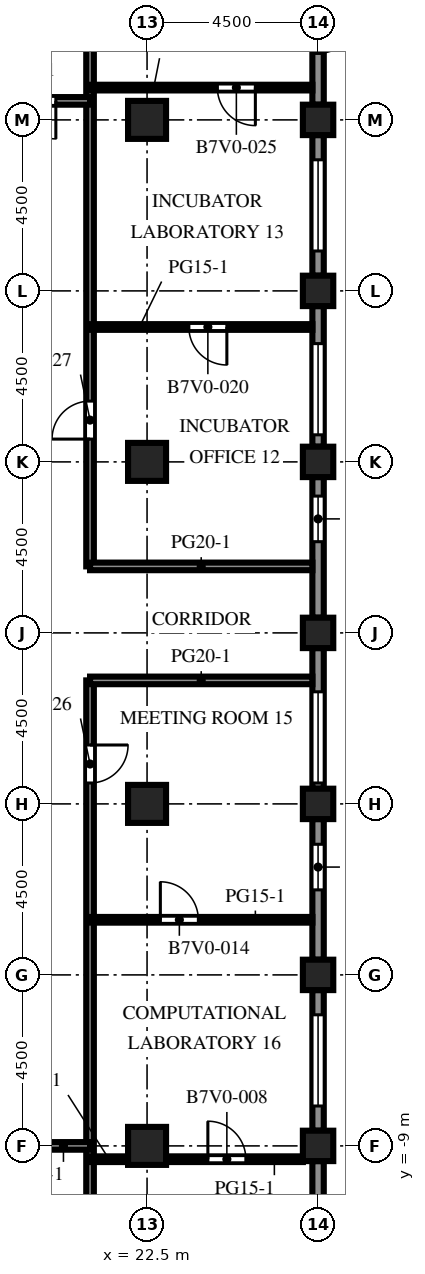
"""IFC4 building model, lengths in metres.
Left out: names, types, materials, properties, quantities, classifications, styles, units other than length and angle.
Written with IfcOpenShell. Run it as: python <this file> out.ifc"""

import sys

from ifc_helpers import new_model, si_unit, direction, frame, frame_2d, origin, origin_2d, place, context, subcontext, project, spatial, rectangle, extrude, element, fill, save


model = new_model("IFC4")
c1 = context("Model", 3, precision=1e-05, world=origin(), true_north=direction((0.0, 1.0)))
c2 = subcontext(c1, "Body", "Model", "MODEL_VIEW")
j1 = project(units=[si_unit("LENGTHUNIT", "METRE"), si_unit("PLANEANGLEUNIT", "RADIAN")], contexts=[c1])
p1 = place(None, origin())
s1 = spatial("IfcSite", under=j1, at=p1, CompositionType="ELEMENT")
p2 = place(p1, origin())
s2 = spatial("IfcBuilding", under=s1, at=p2, CompositionType="ELEMENT")
p3 = place(p2, frame((0.0, 0.0, 239.8)))
s3 = spatial("IfcBuildingStorey", under=s2, at=p3, CompositionType="ELEMENT", Elevation=239.8)
for number, where, z_axis, x_axis in (
    (1, (27.0, -9.0, 0.0), (0.0, 0.0, 1.0), (1.0, 0.0, 0.0)),
    (2, (27.0, -4.5, 0.0), (0.0, 0.0, 1.0), (1.0, 0.0, 0.0)),
    (3, (27.0, 0.0, 0.0), (0.0, 0.0, 1.0), (1.0, 0.0, 0.0)),
    (4, (27.0, 4.5, 0.0), (0.0, 0.0, 1.0), (1.0, 0.0, 0.0)),
    (5, (27.0, 9.0, 0.0), (0.0, 0.0, 1.0), (1.0, 0.0, 0.0)),
    (6, (27.0, 13.5, 0.0), (0.0, 0.0, 1.0), (1.0, 0.0, 0.0)),
    (7, (27.0, 18.0, 0.0), (0.0, 0.0, 1.0), (1.0, 0.0, 0.0)),
):
    element("IfcColumn", number, at=place(p3, frame(where, z_axis=z_axis, x_axis=x_axis)), inside=s3, PredefinedType="COLUMN", context=c2, shape_type="SweptSolid", body=[
        extrude(rectangle(XDim=0.8, YDim=0.8, at=origin_2d()), origin(), (0.0, 0.0, 1.0), 4.1),
    ])
for number, where, z_axis, x_axis in (
    (8, (22.5, -9.0, 0.0), (0.0, 0.0, 1.0), (1.0, 0.0, 0.0)),
    (9, (22.5, 0.0, 0.0), (0.0, 0.0, 1.0), (1.0, 0.0, 0.0)),
    (10, (22.5, 9.0, 0.0), (0.0, 0.0, 1.0), (1.0, 0.0, 0.0)),
    (11, (22.5, 18.0, 0.0), (0.0, 0.0, 1.0), (1.0, 0.0, 0.0)),
):
    element("IfcColumn", number, at=place(p3, frame(where, z_axis=z_axis, x_axis=x_axis)), inside=s3, PredefinedType="COLUMN", context=c2, shape_type="SweptSolid", body=[
        extrude(rectangle(XDim=1.0, YDim=1.0, at=origin_2d()), origin(), (0.0, 0.0, 1.0), 4.1),
    ])
p4 = place(p3, frame((27.0, -9.4, 0.0), z_axis=(0.0, 0.0, 1.0), x_axis=(0.0, -1.0, 0.0)))
e12 = element("IfcWall", 12, at=p4, inside=s3, PredefinedType="SOLIDWALL", context=c2, shape_type="SweptSolid", body=[
    extrude(rectangle(XDim=3.7, YDim=0.3, at=frame_2d((1.85, 0.0))), origin(), (0.0, 0.0, 1.0), 2.85),
])
p5 = place(p4, frame((1.35, 0.0, 0.0)))
e13 = element("IfcOpeningElement", 13, at=p5, cuts=e12, PredefinedType="OPENING", context=c2, shape_type="SweptSolid", body=[
    extrude(rectangle(XDim=1.0, YDim=2.2, at=frame_2d((0.5, 1.1))), frame((0.0, 0.16, 0.0), z_axis=(0.0, -1.0, 0.0), x_axis=(1.0, 0.0, 0.0)), (0.0, 0.0, 1.0), 0.32),
])
p6 = place(p3, frame((27.0, -4.9, 0.0), z_axis=(0.0, 0.0, 1.0), x_axis=(0.0, -1.0, 0.0)))
e14 = element("IfcWall", 14, at=p6, inside=s3, PredefinedType="SOLIDWALL", context=c2, shape_type="SweptSolid", body=[
    extrude(rectangle(XDim=3.7, YDim=0.3, at=frame_2d((1.85, 0.0))), origin(), (0.0, 0.0, 1.0), 2.85),
])
p7 = place(p6, frame((0.65, 0.0, 0.8)))
e15 = element("IfcOpeningElement", 15, at=p7, cuts=e14, PredefinedType="OPENING", context=c2, shape_type="SweptSolid", body=[
    extrude(rectangle(XDim=2.4, YDim=1.7, at=frame_2d((1.2, 0.85))), frame((0.0, 0.16, 0.0), z_axis=(0.0, -1.0, 0.0), x_axis=(1.0, 0.0, 0.0)), (0.0, 0.0, 1.0), 0.32),
])
p8 = place(p3, frame((27.0, -0.4, 0.0), z_axis=(0.0, 0.0, 1.0), x_axis=(0.0, -1.0, 0.0)))
e16 = element("IfcWall", 16, at=p8, inside=s3, PredefinedType="SOLIDWALL", context=c2, shape_type="SweptSolid", body=[
    extrude(rectangle(XDim=3.7, YDim=0.3, at=frame_2d((1.85, 0.0))), origin(), (0.0, 0.0, 1.0), 2.85),
])
p9 = place(p8, frame((0.663, 0.0, 0.8)))
e17 = element("IfcOpeningElement", 17, at=p9, cuts=e16, PredefinedType="OPENING", context=c2, shape_type="SweptSolid", body=[
    extrude(rectangle(XDim=1.2, YDim=1.7, at=frame_2d((0.6, 0.85))), frame((0.0, 0.16, 0.0), z_axis=(0.0, -1.0, 0.0), x_axis=(1.0, 0.0, 0.0)), (0.0, 0.0, 1.0), 0.32),
])
p10 = place(p3, frame((27.0, 4.1, 0.0), z_axis=(0.0, 0.0, 1.0), x_axis=(0.0, -1.0, 0.0)))
e18 = element("IfcWall", 18, at=p10, inside=s3, PredefinedType="SOLIDWALL", context=c2, shape_type="SweptSolid", body=[
    extrude(rectangle(XDim=3.7, YDim=0.3, at=frame_2d((1.85, 0.0))), origin(), (0.0, 0.0, 1.0), 2.85),
])
p11 = place(p10, frame((1.15, 0.0, 0.8)))
e19 = element("IfcOpeningElement", 19, at=p11, cuts=e18, PredefinedType="OPENING", context=c2, shape_type="SweptSolid", body=[
    extrude(rectangle(XDim=2.4, YDim=1.7, at=frame_2d((1.2, 0.85))), frame((0.0, 0.16, 0.0), z_axis=(0.0, -1.0, 0.0), x_axis=(1.0, 0.0, 0.0)), (0.0, 0.0, 1.0), 0.32),
])
p12 = place(p3, frame((27.0, 8.6, 0.0), z_axis=(0.0, 0.0, 1.0), x_axis=(0.0, -1.0, 0.0)))
e20 = element("IfcWall", 20, at=p12, inside=s3, PredefinedType="SOLIDWALL", context=c2, shape_type="SweptSolid", body=[
    extrude(rectangle(XDim=3.7, YDim=0.3, at=frame_2d((1.85, 0.0))), origin(), (0.0, 0.0, 1.0), 2.85),
])
p13 = place(p12, frame((0.5, 0.0, 0.8)))
e21 = element("IfcOpeningElement", 21, at=p13, cuts=e20, PredefinedType="OPENING", context=c2, shape_type="SweptSolid", body=[
    extrude(rectangle(XDim=1.2, YDim=1.7, at=frame_2d((0.6, 0.85))), frame((0.0, 0.16, 0.0), z_axis=(0.0, -1.0, 0.0), x_axis=(1.0, 0.0, 0.0)), (0.0, 0.0, 1.0), 0.32),
])
p14 = place(p3, frame((27.0, 13.1, 0.0), z_axis=(0.0, 0.0, 1.0), x_axis=(0.0, -1.0, 0.0)))
e22 = element("IfcWall", 22, at=p14, inside=s3, PredefinedType="SOLIDWALL", context=c2, shape_type="SweptSolid", body=[
    extrude(rectangle(XDim=3.7, YDim=0.3, at=frame_2d((1.85, 0.0))), origin(), (0.0, 0.0, 1.0), 2.85),
])
p15 = place(p14, frame((0.988, 0.0, 0.8)))
e23 = element("IfcOpeningElement", 23, at=p15, cuts=e22, PredefinedType="OPENING", context=c2, shape_type="SweptSolid", body=[
    extrude(rectangle(XDim=2.4, YDim=1.7, at=frame_2d((1.2, 0.85))), frame((0.0, 0.16, 0.0), z_axis=(0.0, -1.0, 0.0), x_axis=(1.0, 0.0, 0.0)), (0.0, 0.0, 1.0), 0.32),
])
p16 = place(p3, frame((27.0, 17.6, 0.0), z_axis=(0.0, 0.0, 1.0), x_axis=(0.0, -1.0, 0.0)))
e24 = element("IfcWall", 24, at=p16, inside=s3, PredefinedType="SOLIDWALL", context=c2, shape_type="SweptSolid", body=[
    extrude(rectangle(XDim=3.7, YDim=0.3, at=frame_2d((1.85, 0.0))), origin(), (0.0, 0.0, 1.0), 2.85),
])
p17 = place(p16, frame((0.65, 0.0, 0.8)))
e25 = element("IfcOpeningElement", 25, at=p17, cuts=e24, PredefinedType="OPENING", context=c2, shape_type="SweptSolid", body=[
    extrude(rectangle(XDim=2.4, YDim=1.7, at=frame_2d((1.2, 0.85))), frame((0.0, 0.16, 0.0), z_axis=(0.0, -1.0, 0.0), x_axis=(1.0, 0.0, 0.0)), (0.0, 0.0, 1.0), 0.32),
])
p18 = place(p3, frame((27.0, 22.1, 0.0), z_axis=(0.0, 0.0, 1.0), x_axis=(0.0, -1.0, 0.0)))
e26 = element("IfcWall", 26, at=p18, inside=s3, PredefinedType="SOLIDWALL", context=c2, shape_type="SweptSolid", body=[
    extrude(rectangle(XDim=3.7, YDim=0.3, at=frame_2d((1.85, 0.0))), origin(), (0.0, 0.0, 1.0), 2.85),
])
p19 = place(p18, frame((1.35, 0.0, 0.0)))
e27 = element("IfcOpeningElement", 27, at=p19, cuts=e26, PredefinedType="OPENING", context=c2, shape_type="SweptSolid", body=[
    extrude(rectangle(XDim=1.0, YDim=2.2, at=frame_2d((0.5, 1.1))), frame((0.0, 0.16, 0.0), z_axis=(0.0, -1.0, 0.0), x_axis=(1.0, 0.0, 0.0)), (0.0, 0.0, 1.0), 0.32),
])
p20 = place(p3, frame((21.0, 3.25, 0.0), z_axis=(0.0, 0.0, 1.0), x_axis=(0.0, -1.0, 0.0)))
e28 = element("IfcWall", 28, at=p20, inside=s3, PredefinedType="PARTITIONING", context=c2, shape_type="SweptSolid", body=[
    extrude(rectangle(XDim=25.6, YDim=0.2, at=frame_2d((12.8, 0.0))), origin(), (0.0, 0.0, 1.0), 3.65),
])
p21 = place(p20, frame((1.7, 0.0, 0.0)))
e29 = element("IfcOpeningElement", 29, at=p21, cuts=e28, PredefinedType="OPENING", context=c2, shape_type="SweptSolid", body=[
    extrude(rectangle(XDim=1.0, YDim=2.1, at=frame_2d((0.5, 1.05))), frame((0.0, 0.11, 0.0), z_axis=(0.0, -1.0, 0.0), x_axis=(1.0, 0.0, 0.0)), (0.0, 0.0, 1.0), 0.22),
])
p22 = place(p3, frame((21.0, 31.35, 0.0), z_axis=(0.0, 0.0, 1.0), x_axis=(0.0, -1.0, 0.0)))
e30 = element("IfcWall", 30, at=p22, inside=s3, PredefinedType="PARTITIONING", context=c2, shape_type="SweptSolid", body=[
    extrude(rectangle(XDim=25.1, YDim=0.2, at=frame_2d((12.55, 0.0))), origin(), (0.0, 0.0, 1.0), 3.65),
])
p23 = place(p22, frame((20.75, 0.0, 0.0)))
e31 = element("IfcOpeningElement", 31, at=p23, cuts=e30, PredefinedType="OPENING", context=c2, shape_type="SweptSolid", body=[
    extrude(rectangle(XDim=1.0, YDim=2.1, at=frame_2d((0.5, 1.05))), frame((0.0, 0.11, 0.0), z_axis=(0.0, -1.0, 0.0), x_axis=(1.0, 0.0, 0.0)), (0.0, 0.0, 1.0), 0.22),
])
p24 = place(p3, frame((21.0, -9.35, 0.0), z_axis=(0.0, 0.0, 1.0), x_axis=(1.0, 0.0, 0.0)))
e32 = element("IfcWall", 32, at=p24, inside=s3, PredefinedType="PARTITIONING", context=c2, shape_type="SweptSolid", body=[
    extrude(rectangle(XDim=1.0, YDim=0.15, at=frame_2d((0.5, 0.0))), origin(), (0.0, 0.0, 1.0), 3.65),
])
p25 = place(p3, frame((26.6, -9.35, 0.0), z_axis=(0.0, 0.0, 1.0), x_axis=(-1.0, 0.0, 0.0)))
e33 = element("IfcWall", 33, at=p25, inside=s3, PredefinedType="PARTITIONING", context=c2, shape_type="SweptSolid", body=[
    extrude(rectangle(XDim=3.6, YDim=0.15, at=frame_2d((1.8, 0.0))), origin(), (0.0, 0.0, 1.0), 3.65),
])
p26 = place(p25, frame((1.5, 0.0, 0.0)))
e34 = element("IfcOpeningElement", 34, at=p26, cuts=e33, PredefinedType="OPENING", context=c2, shape_type="SweptSolid", body=[
    extrude(rectangle(XDim=1.0, YDim=2.1, at=frame_2d((0.5, 1.05))), frame((0.0, 0.085, 0.0), z_axis=(0.0, -1.0, 0.0), x_axis=(1.0, 0.0, 0.0)), (0.0, 0.0, 1.0), 0.17),
])
p27 = place(p3, frame((21.0, -9.0, 0.0), z_axis=(0.0, 0.0, 1.0), x_axis=(-1.0, 0.0, 0.0)))
e35 = element("IfcWall", 35, at=p27, inside=s3, PredefinedType="PARTITIONING", context=c2, shape_type="SweptSolid", body=[
    extrude(rectangle(XDim=3.0, YDim=0.2, at=frame_2d((1.5, 0.0))), origin(), (0.0, 0.0, 1.0), 3.65),
])
p28 = place(p27, frame((1.4, 0.0, 0.0)))
e36 = element("IfcOpeningElement", 36, at=p28, cuts=e35, PredefinedType="OPENING", context=c2, shape_type="SweptSolid", body=[
    extrude(rectangle(XDim=1.0, YDim=2.1, at=frame_2d((0.5, 1.05))), frame((0.0, 0.11, 0.0), z_axis=(0.0, -1.0, 0.0), x_axis=(1.0, 0.0, 0.0)), (0.0, 0.0, 1.0), 0.22),
])
p29 = place(p3, frame((26.85, -3.05, 0.0), z_axis=(0.0, 0.0, 1.0), x_axis=(-1.0, 0.0, 0.0)))
e37 = element("IfcWall", 37, at=p29, inside=s3, PredefinedType="PARTITIONING", context=c2, shape_type="SweptSolid", body=[
    extrude(rectangle(XDim=5.85, YDim=0.15, at=frame_2d((2.925, 0.0))), origin(), (0.0, 0.0, 1.0), 3.65),
])
p30 = place(p29, frame((3.0, 0.0, 0.0)))
e38 = element("IfcOpeningElement", 38, at=p30, cuts=e37, PredefinedType="OPENING", context=c2, shape_type="SweptSolid", body=[
    extrude(rectangle(XDim=1.0, YDim=2.1, at=frame_2d((0.5, 1.05))), frame((0.0, 0.085, 0.0), z_axis=(0.0, -1.0, 0.0), x_axis=(1.0, 0.0, 0.0)), (0.0, 0.0, 1.0), 0.17),
])
for number, where, z_axis, x_axis in (
    (39, (21.0, 3.25, 0.0), (0.0, 0.0, 1.0), (1.0, 0.0, 0.0)),
    (40, (21.0, 6.25, 0.0), (0.0, 0.0, 1.0), (1.0, 0.0, 0.0)),
):
    element("IfcWall", number, at=place(p3, frame(where, z_axis=z_axis, x_axis=x_axis)), inside=s3, PredefinedType="PARTITIONING", context=c2, shape_type="SweptSolid", body=[
        extrude(rectangle(XDim=5.85, YDim=0.2, at=frame_2d((2.925, 0.0))), origin(), (0.0, 0.0, 1.0), 3.65),
    ])
p31 = place(p3, frame((21.0, 12.55, 0.0), z_axis=(0.0, 0.0, 1.0), x_axis=(1.0, 0.0, 0.0)))
e41 = element("IfcWall", 41, at=p31, inside=s3, PredefinedType="PARTITIONING", context=c2, shape_type="SweptSolid", body=[
    extrude(rectangle(XDim=5.85, YDim=0.15, at=frame_2d((2.925, 0.0))), origin(), (0.0, 0.0, 1.0), 3.65),
])
p32 = place(p31, frame((2.6, 0.0, 0.0)))
e42 = element("IfcOpeningElement", 42, at=p32, cuts=e41, PredefinedType="OPENING", context=c2, shape_type="SweptSolid", body=[
    extrude(rectangle(XDim=1.0, YDim=2.1, at=frame_2d((0.5, 1.05))), frame((0.0, 0.085, 0.0), z_axis=(0.0, -1.0, 0.0), x_axis=(1.0, 0.0, 0.0)), (0.0, 0.0, 1.0), 0.17),
])
p33 = place(p3, frame((18.0, 18.5, 0.0), z_axis=(0.0, 0.0, 1.0), x_axis=(1.0, 0.0, 0.0)))
e43 = element("IfcWall", 43, at=p33, inside=s3, PredefinedType="PARTITIONING", context=c2, shape_type="SweptSolid", body=[
    extrude(rectangle(XDim=3.0, YDim=0.2, at=frame_2d((1.5, 0.0))), origin(), (0.0, 0.0, 1.0), 3.65),
])
p34 = place(p33, frame((1.1, 0.0, 0.0)))
e44 = element("IfcOpeningElement", 44, at=p34, cuts=e43, PredefinedType="OPENING", context=c2, shape_type="SweptSolid", body=[
    extrude(rectangle(XDim=1.0, YDim=2.1, at=frame_2d((0.5, 1.05))), frame((0.0, 0.11, 0.0), z_axis=(0.0, -1.0, 0.0), x_axis=(1.0, 0.0, 0.0)), (0.0, 0.0, 1.0), 0.22),
])
p35 = place(p3, frame((21.0, 18.85, 0.0), z_axis=(0.0, 0.0, 1.0), x_axis=(1.0, 0.0, 0.0)))
e45 = element("IfcWall", 45, at=p35, inside=s3, PredefinedType="PARTITIONING", context=c2, shape_type="SweptSolid", body=[
    extrude(rectangle(XDim=5.85, YDim=0.15, at=frame_2d((2.925, 0.0))), origin(), (0.0, 0.0, 1.0), 3.65),
])
p36 = place(p35, frame((3.35, 0.0, 0.0)))
e46 = element("IfcOpeningElement", 46, at=p36, cuts=e45, PredefinedType="OPENING", context=c2, shape_type="SweptSolid", body=[
    extrude(rectangle(XDim=1.0, YDim=2.1, at=frame_2d((0.5, 1.05))), frame((0.0, 0.085, 0.0), z_axis=(0.0, -1.0, 0.0), x_axis=(1.0, 0.0, 0.0)), (0.0, 0.0, 1.0), 0.17),
])
p37 = place(p7, origin())
e47 = element("IfcWindow", 47, at=p37, inside=s3, PartitioningType="SINGLE_PANEL", PredefinedType="WINDOW", context=c2, shape_type="SweptSolid", body=[
    extrude(rectangle(XDim=2.4, YDim=1.7, at=frame_2d((1.2, 0.85))), frame((0.0, 0.03, 0.0), z_axis=(0.0, -1.0, 0.0), x_axis=(1.0, 0.0, 0.0)), (0.0, 0.0, 1.0), 0.06),
])
fill(e15, e47)
p38 = place(p9, origin())
e48 = element("IfcWindow", 48, at=p38, inside=s3, PartitioningType="SINGLE_PANEL", PredefinedType="WINDOW", context=c2, shape_type="SweptSolid", body=[
    extrude(rectangle(XDim=1.2, YDim=1.7, at=frame_2d((0.6, 0.85))), frame((0.0, 0.03, 0.0), z_axis=(0.0, -1.0, 0.0), x_axis=(1.0, 0.0, 0.0)), (0.0, 0.0, 1.0), 0.06),
])
fill(e17, e48)
p39 = place(p11, origin())
e49 = element("IfcWindow", 49, at=p39, inside=s3, PartitioningType="SINGLE_PANEL", PredefinedType="WINDOW", context=c2, shape_type="SweptSolid", body=[
    extrude(rectangle(XDim=2.4, YDim=1.7, at=frame_2d((1.2, 0.85))), frame((0.0, 0.03, 0.0), z_axis=(0.0, -1.0, 0.0), x_axis=(1.0, 0.0, 0.0)), (0.0, 0.0, 1.0), 0.06),
])
fill(e19, e49)
p40 = place(p13, origin())
e50 = element("IfcWindow", 50, at=p40, inside=s3, PartitioningType="SINGLE_PANEL", PredefinedType="WINDOW", context=c2, shape_type="SweptSolid", body=[
    extrude(rectangle(XDim=1.2, YDim=1.7, at=frame_2d((0.6, 0.85))), frame((0.0, 0.03, 0.0), z_axis=(0.0, -1.0, 0.0), x_axis=(1.0, 0.0, 0.0)), (0.0, 0.0, 1.0), 0.06),
])
fill(e21, e50)
p41 = place(p15, origin())
e51 = element("IfcWindow", 51, at=p41, inside=s3, PartitioningType="SINGLE_PANEL", PredefinedType="WINDOW", context=c2, shape_type="SweptSolid", body=[
    extrude(rectangle(XDim=2.4, YDim=1.7, at=frame_2d((1.2, 0.85))), frame((0.0, 0.03, 0.0), z_axis=(0.0, -1.0, 0.0), x_axis=(1.0, 0.0, 0.0)), (0.0, 0.0, 1.0), 0.06),
])
fill(e23, e51)
p42 = place(p17, origin())
e52 = element("IfcWindow", 52, at=p42, inside=s3, PartitioningType="SINGLE_PANEL", PredefinedType="WINDOW", context=c2, shape_type="SweptSolid", body=[
    extrude(rectangle(XDim=2.4, YDim=1.7, at=frame_2d((1.2, 0.85))), frame((0.0, 0.03, 0.0), z_axis=(0.0, -1.0, 0.0), x_axis=(1.0, 0.0, 0.0)), (0.0, 0.0, 1.0), 0.06),
])
fill(e25, e52)
p43 = place(p19, origin())
e53 = element("IfcDoor", 53, at=p43, inside=s3, OperationType="SINGLE_SWING_LEFT", PredefinedType="DOOR", context=c2, shape_type="SweptSolid", body=[
    extrude(rectangle(XDim=1.0, YDim=2.2, at=frame_2d((0.5, 1.1))), frame((0.0, 0.025, 0.0), z_axis=(0.0, -1.0, 0.0), x_axis=(1.0, 0.0, 0.0)), (0.0, 0.0, 1.0), 0.05),
])
fill(e27, e53)
p44 = place(p26, origin())
e54 = element("IfcDoor", 54, at=p44, inside=s3, OperationType="SINGLE_SWING_RIGHT", PredefinedType="DOOR", context=c2, shape_type="SweptSolid", body=[
    extrude(rectangle(XDim=1.0, YDim=2.1, at=frame_2d((0.5, 1.05))), frame((0.0, 0.025, 0.0), z_axis=(0.0, -1.0, 0.0), x_axis=(1.0, 0.0, 0.0)), (0.0, 0.0, 1.0), 0.05),
])
fill(e34, e54)
p45 = place(p30, origin())
e55 = element("IfcDoor", 55, at=p45, inside=s3, OperationType="SINGLE_SWING_RIGHT", PredefinedType="DOOR", context=c2, shape_type="SweptSolid", body=[
    extrude(rectangle(XDim=1.0, YDim=2.1, at=frame_2d((0.5, 1.05))), frame((0.0, 0.025, 0.0), z_axis=(0.0, -1.0, 0.0), x_axis=(1.0, 0.0, 0.0)), (0.0, 0.0, 1.0), 0.05),
])
fill(e38, e55)
p46 = place(p32, origin())
e56 = element("IfcDoor", 56, at=p46, inside=s3, OperationType="SINGLE_SWING_RIGHT", PredefinedType="DOOR", context=c2, shape_type="SweptSolid", body=[
    extrude(rectangle(XDim=1.0, YDim=2.1, at=frame_2d((0.5, 1.05))), frame((0.0, 0.025, 0.0), z_axis=(0.0, -1.0, 0.0), x_axis=(1.0, 0.0, 0.0)), (0.0, 0.0, 1.0), 0.05),
])
fill(e42, e56)
p47 = place(p34, origin())
e57 = element("IfcDoor", 57, at=p47, inside=s3, OperationType="SINGLE_SWING_RIGHT", PredefinedType="DOOR", context=c2, shape_type="SweptSolid", body=[
    extrude(rectangle(XDim=1.0, YDim=2.1, at=frame_2d((0.5, 1.05))), frame((0.0, 0.025, 0.0), z_axis=(0.0, -1.0, 0.0), x_axis=(1.0, 0.0, 0.0)), (0.0, 0.0, 1.0), 0.05),
])
fill(e44, e57)
p48 = place(p36, origin())
e58 = element("IfcDoor", 58, at=p48, inside=s3, OperationType="SINGLE_SWING_RIGHT", PredefinedType="DOOR", context=c2, shape_type="SweptSolid", body=[
    extrude(rectangle(XDim=1.0, YDim=2.1, at=frame_2d((0.5, 1.05))), frame((0.0, 0.025, 0.0), z_axis=(0.0, -1.0, 0.0), x_axis=(1.0, 0.0, 0.0)), (0.0, 0.0, 1.0), 0.05),
])
fill(e46, e58)
p49 = place(p21, origin())
e59 = element("IfcDoor", 59, at=p49, inside=s3, OperationType="SINGLE_SWING_LEFT", PredefinedType="DOOR", context=c2, shape_type="SweptSolid", body=[
    extrude(rectangle(XDim=1.0, YDim=2.1, at=frame_2d((0.5, 1.05))), frame((0.0, 0.025, 0.0), z_axis=(0.0, -1.0, 0.0), x_axis=(1.0, 0.0, 0.0)), (0.0, 0.0, 1.0), 0.05),
])
fill(e29, e59)
p50 = place(p23, origin())
e60 = element("IfcDoor", 60, at=p50, inside=s3, OperationType="SINGLE_SWING_RIGHT", PredefinedType="DOOR", context=c2, shape_type="SweptSolid", body=[
    extrude(rectangle(XDim=1.0, YDim=2.1, at=frame_2d((0.5, 1.05))), frame((0.0, 0.025, 0.0), z_axis=(0.0, -1.0, 0.0), x_axis=(1.0, 0.0, 0.0)), (0.0, 0.0, 1.0), 0.05),
])
fill(e31, e60)
save(model, sys.argv[1])
